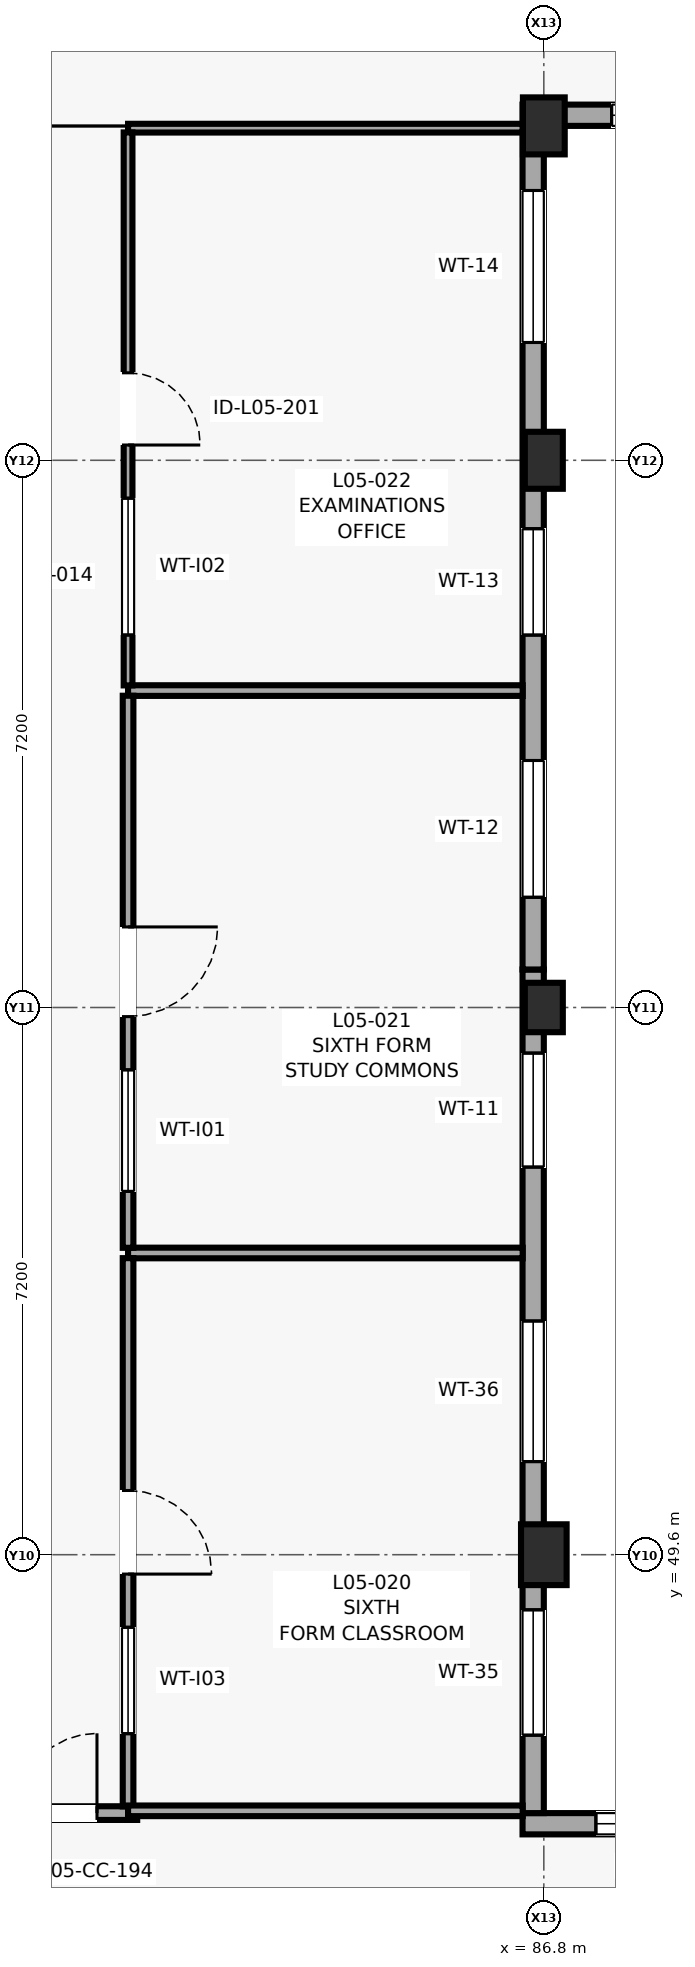
"""IFC4 building model, lengths in metres.
Left out: names, types, materials, properties, quantities, classifications, styles, units other than length and angle.
Written with IfcOpenShell. Run it as: python <this file> out.ifc"""

import sys

from ifc_helpers import new_model, si_unit, direction, frame, frame_2d, origin, origin_2d, place, context, subcontext, project, spatial, polyline, rectangle, outline, extrude, element, fill, save


model = new_model("IFC4")
c1 = context("Model", 3, precision=1e-05, world=origin(), true_north=direction((0.0, 1.0)))
c2 = subcontext(c1, "Body", "Model", "MODEL_VIEW")
j1 = project(units=[si_unit("LENGTHUNIT", "METRE"), si_unit("PLANEANGLEUNIT", "RADIAN")], contexts=[c1])
p1 = place(None, origin())
s1 = spatial("IfcSite", under=j1, at=p1, CompositionType="ELEMENT")
p2 = place(p1, origin())
s2 = spatial("IfcBuilding", under=s1, at=p2, CompositionType="ELEMENT")
p3 = place(p2, frame((0.0, 0.0, 20.2)))
s3 = spatial("IfcBuildingStorey", under=s2, at=p3, CompositionType="ELEMENT", Elevation=20.2)
p4 = place(p3, frame((86.8, 49.6, 0.0), z_axis=(0.0, 0.0, 1.0), x_axis=(1.0, 0.0, 0.0)))
e1 = element("IfcColumn", 1, at=p4, inside=s3, PredefinedType="COLUMN", context=c2, shape_type="SweptSolid", body=[
    extrude(rectangle(XDim=0.6, YDim=0.8, at=origin_2d()), origin(), (0.0, 0.0, 1.0), 4.0),
])
p5 = place(p3, frame((86.8, 56.8, 0.0), z_axis=(0.0, 0.0, 1.0), x_axis=(1.0, 0.0, 0.0)))
e2 = element("IfcColumn", 2, at=p5, inside=s3, PredefinedType="COLUMN", context=c2, shape_type="SweptSolid", body=[
    extrude(rectangle(XDim=0.5, YDim=0.65, at=origin_2d()), origin(), (0.0, 0.0, 1.0), 4.0),
])
p6 = place(p3, frame((86.8, 64.0, 0.0), z_axis=(0.0, 0.0, 1.0), x_axis=(1.0, 0.0, 0.0)))
e3 = element("IfcColumn", 3, at=p6, inside=s3, PredefinedType="COLUMN", context=c2, shape_type="SweptSolid", body=[
    extrude(rectangle(XDim=0.5, YDim=0.75, at=origin_2d()), origin(), (0.0, 0.0, 1.0), 4.0),
])
p7 = place(p3, frame((86.8, 68.4, 0.0), z_axis=(0.0, 0.0, 1.0), x_axis=(1.0, 0.0, 0.0)))
e4 = element("IfcColumn", 4, at=p7, inside=s3, PredefinedType="COLUMN", context=c2, shape_type="SweptSolid", body=[
    extrude(rectangle(XDim=0.55, YDim=0.75, at=origin_2d()), origin(), (0.0, 0.0, 1.0), 4.0),
])
p8 = place(p3, frame((89.8, 46.06, 0.0), z_axis=(0.0, 0.0, 1.0), x_axis=(-1.0, 0.0, 0.0)))
e5 = element("IfcWall", 5, at=p8, inside=s3, PredefinedType="SOLIDWALL", context=c2, shape_type="SweptSolid", body=[
    extrude(rectangle(XDim=3.28, YDim=0.28, at=frame_2d((1.64, 0.0))), origin(), (0.0, 0.0, 1.0), 3.78),
])
p9 = place(p8, frame((0.965, 0.0, 1.05)))
e6 = element("IfcOpeningElement", 6, at=p9, cuts=e5, PredefinedType="OPENING", context=c2, shape_type="SweptSolid", body=[
    extrude(rectangle(XDim=1.35, YDim=1.2, at=frame_2d((0.675, 0.6))), frame((0.0, 0.15, 0.0), z_axis=(0.0, -1.0, 0.0), x_axis=(1.0, 0.0, 0.0)), (0.0, 0.0, 1.0), 0.3),
])
p10 = place(p3, frame((86.66, 46.2, 0.0), z_axis=(0.0, 0.0, 1.0), x_axis=(0.0, 1.0, 0.0)))
e7 = element("IfcWall", 7, at=p10, inside=s3, PredefinedType="SOLIDWALL", context=c2, shape_type="SweptSolid", body=[
    extrude(rectangle(XDim=11.1, YDim=0.28, at=frame_2d((5.55, 0.0))), origin(), (0.0, 0.0, 1.0), 3.205),
])
p11 = place(p10, frame((1.025, 0.0, 1.05)))
e8 = element("IfcOpeningElement", 8, at=p11, cuts=e7, PredefinedType="OPENING", context=c2, shape_type="SweptSolid", body=[
    extrude(rectangle(XDim=1.65, YDim=1.25, at=frame_2d((0.825, 0.625))), frame((0.0, 0.15, 0.0), z_axis=(0.0, -1.0, 0.0), x_axis=(1.0, 0.0, 0.0)), (0.0, 0.0, 1.0), 0.3),
])
p12 = place(p10, frame((4.625, 0.0, 1.05)))
e9 = element("IfcOpeningElement", 9, at=p12, cuts=e7, PredefinedType="OPENING", context=c2, shape_type="SweptSolid", body=[
    extrude(rectangle(XDim=1.85, YDim=1.4, at=frame_2d((0.925, 0.7))), frame((0.0, 0.15, 0.0), z_axis=(0.0, -1.0, 0.0), x_axis=(1.0, 0.0, 0.0)), (0.0, 0.0, 1.0), 0.3),
])
p13 = place(p10, frame((8.5, 0.0, 0.75)))
e10 = element("IfcOpeningElement", 10, at=p13, cuts=e7, PredefinedType="OPENING", context=c2, shape_type="SweptSolid", body=[
    extrude(rectangle(XDim=1.5, YDim=2.2, at=frame_2d((0.75, 1.1))), frame((0.0, 0.15, 0.0), z_axis=(0.0, -1.0, 0.0), x_axis=(1.0, 0.0, 0.0)), (0.0, 0.0, 1.0), 0.3),
])
p14 = place(p3, frame((86.66, 57.3, 0.0), z_axis=(0.0, 0.0, 1.0), x_axis=(0.0, 1.0, 0.0)))
e11 = element("IfcWall", 11, at=p14, inside=s3, PredefinedType="SOLIDWALL", context=c2, shape_type="SweptSolid", body=[
    extrude(rectangle(XDim=11.1, YDim=0.28, at=frame_2d((5.55, 0.0))), origin(), (0.0, 0.0, 1.0), 3.155),
])
p15 = place(p14, frame((0.95, 0.0, 0.75)))
e12 = element("IfcOpeningElement", 12, at=p15, cuts=e11, PredefinedType="OPENING", context=c2, shape_type="SweptSolid", body=[
    extrude(rectangle(XDim=1.8, YDim=2.25, at=frame_2d((0.9, 1.125))), frame((0.0, 0.15, 0.0), z_axis=(0.0, -1.0, 0.0), x_axis=(1.0, 0.0, 0.0)), (0.0, 0.0, 1.0), 0.3),
])
p16 = place(p14, frame((4.4, 0.0, 0.65)))
e13 = element("IfcOpeningElement", 13, at=p16, cuts=e11, PredefinedType="OPENING", context=c2, shape_type="SweptSolid", body=[
    extrude(rectangle(XDim=1.4, YDim=2.4, at=frame_2d((0.7, 1.2))), frame((0.0, 0.15, 0.0), z_axis=(0.0, -1.0, 0.0), x_axis=(1.0, 0.0, 0.0)), (0.0, 0.0, 1.0), 0.3),
])
p17 = place(p14, frame((8.25, 0.0, 0.75)))
e14 = element("IfcOpeningElement", 14, at=p17, cuts=e11, PredefinedType="OPENING", context=c2, shape_type="SweptSolid", body=[
    extrude(rectangle(XDim=2.0, YDim=2.1, at=frame_2d((1.0, 1.05))), frame((0.0, 0.15, 0.0), z_axis=(0.0, -1.0, 0.0), x_axis=(1.0, 0.0, 0.0)), (0.0, 0.0, 1.0), 0.3),
])
p18 = place(p3, frame((86.52, 68.54, 0.0), z_axis=(0.0, 0.0, 1.0), x_axis=(1.0, 0.0, 0.0)))
e15 = element("IfcWall", 15, at=p18, inside=s3, PredefinedType="SOLIDWALL", context=c2, shape_type="SweptSolid", body=[
    extrude(rectangle(XDim=11.98, YDim=0.28, at=frame_2d((5.99, 0.0))), origin(), (0.0, 0.0, 1.0), 3.78),
])
p19 = place(p18, frame((1.172, 0.0, 0.85)))
e16 = element("IfcOpeningElement", 16, at=p19, cuts=e15, PredefinedType="OPENING", context=c2, shape_type="SweptSolid", body=[
    extrude(rectangle(XDim=1.65, YDim=1.95, at=frame_2d((0.825, 0.975))), frame((0.0, 0.15, 0.0), z_axis=(0.0, -1.0, 0.0), x_axis=(1.0, 0.0, 0.0)), (0.0, 0.0, 1.0), 0.3),
])
p20 = place(p18, frame((5.44, 0.0, 0.75)))
e17 = element("IfcOpeningElement", 17, at=p20, cuts=e15, PredefinedType="OPENING", context=c2, shape_type="SweptSolid", body=[
    extrude(rectangle(XDim=1.1, YDim=2.1, at=frame_2d((0.55, 1.05))), frame((0.0, 0.15, 0.0), z_axis=(0.0, -1.0, 0.0), x_axis=(1.0, 0.0, 0.0)), (0.0, 0.0, 1.0), 0.3),
])
p21 = place(p18, frame((9.208, 0.0, 0.85)))
e18 = element("IfcOpeningElement", 18, at=p21, cuts=e15, PredefinedType="OPENING", context=c2, shape_type="SweptSolid", body=[
    extrude(rectangle(XDim=1.55, YDim=1.85, at=frame_2d((0.775, 0.925))), frame((0.0, 0.15, 0.0), z_axis=(0.0, -1.0, 0.0), x_axis=(1.0, 0.0, 0.0)), (0.0, 0.0, 1.0), 0.3),
])
p22 = place(p3, frame((89.799, 46.102, 4.0), z_axis=(0.0, 0.0, 1.0), x_axis=(-1.0, 0.0, 0.0)))
e19 = element("IfcWall", 19, at=p22, inside=s3, PredefinedType="PARAPET", context=c2, shape_type="SweptSolid", body=[
    extrude(rectangle(XDim=3.194, YDim=0.165, at=frame_2d((1.597, 0.0))), origin(), (0.0, 0.0, 1.0), 1.12),
])
p23 = place(p3, frame((86.702, 46.199, 4.0), z_axis=(0.0, 0.0, 1.0), x_axis=(0.0, 1.0, 0.0)))
e20 = element("IfcWall", 20, at=p23, inside=s3, PredefinedType="PARAPET", context=c2, shape_type="SweptSolid", body=[
    extrude(outline(polyline([(0.0, 0.0), (22.006, 0.0), (22.006, 1.12), (14.964, 1.12), (14.914, 1.46), (7.092, 1.46), (7.042, 1.12), (0.0, 1.12), (0.0, 0.0)])), frame((0.0, 0.098, 0.0), z_axis=(0.0, -1.0, 0.0), x_axis=(1.0, 0.0, 0.0)), (0.0, 0.0, 1.0), 0.195),
])
p24 = place(p3, frame((86.799, 68.302, 4.0), z_axis=(0.0, 0.0, 1.0), x_axis=(-1.0, 0.0, 0.0)))
e21 = element("IfcWall", 21, at=p24, inside=s3, PredefinedType="PARAPET", context=c2, shape_type="SweptSolid", body=[
    extrude(rectangle(XDim=7.598, YDim=0.195, at=frame_2d((3.799, 0.0))), origin(), (0.0, 0.0, 1.0), 1.12),
])
p25 = place(p3, frame((75.6, 68.498, 4.0), z_axis=(0.0, 0.0, 1.0), x_axis=(1.0, 0.0, 0.0)))
e22 = element("IfcWall", 22, at=p25, inside=s3, PredefinedType="PARAPET", context=c2, shape_type="SweptSolid", body=[
    extrude(outline(polyline([(0.0, 0.0), (39.999, 0.0), (39.999, 1.12), (27.199, 1.12), (27.149, 1.46), (12.85, 1.46), (12.8, 1.12), (0.0, 1.12), (0.0, 0.0)])), frame((0.0, 0.098, 0.0), z_axis=(0.0, -1.0, 0.0), x_axis=(1.0, 0.0, 0.0)), (0.0, 0.0, 1.0), 0.195),
])
p26 = place(p3, frame((79.341, 46.2, 0.0), z_axis=(0.0, 0.0, 1.0), x_axis=(1.0, 0.0, 0.0)))
e23 = element("IfcWall", 23, at=p26, inside=s3, PredefinedType="PARTITIONING", context=c2, shape_type="SweptSolid", body=[
    extrude(rectangle(XDim=2.109, YDim=0.18, at=frame_2d((1.054, 0.0))), origin(), (0.0, 0.0, 1.0), 3.78),
])
p27 = place(p26, frame((0.53, 0.0, 0.0)))
e24 = element("IfcOpeningElement", 24, at=p27, cuts=e23, PredefinedType="OPENING", context=c2, shape_type="SweptSolid", body=[
    extrude(rectangle(XDim=1.05, YDim=2.15, at=frame_2d((0.525, 1.075))), frame((0.0, 0.1, 0.0), z_axis=(0.0, -1.0, 0.0), x_axis=(1.0, 0.0, 0.0)), (0.0, 0.0, 1.0), 0.2),
])
p28 = place(p3, frame((86.522, 53.57, 0.0), z_axis=(0.0, 0.0, 1.0), x_axis=(-1.0, 0.0, 0.0)))
e25 = element("IfcWall", 25, at=p28, inside=s3, PredefinedType="PARTITIONING", context=c2, shape_type="SweptSolid", body=[
    extrude(rectangle(XDim=5.192, YDim=0.14, at=frame_2d((2.596, 0.0))), origin(), (0.0, 0.0, 1.0), 3.755),
])
p29 = place(p3, frame((81.33, 53.502, 0.0), z_axis=(0.0, 0.0, 1.0), x_axis=(0.0, -1.0, 0.0)))
e26 = element("IfcWall", 26, at=p29, inside=s3, PredefinedType="PARTITIONING", context=c2, shape_type="SweptSolid", body=[
    extrude(rectangle(XDim=7.214, YDim=0.14, at=frame_2d((3.607, 0.0))), origin(), (0.0, 0.0, 1.0), 3.755),
])
p30 = place(p29, frame((3.057, 0.0, 0.0)))
e27 = element("IfcOpeningElement", 27, at=p30, cuts=e26, PredefinedType="OPENING", context=c2, shape_type="SweptSolid", body=[
    extrude(rectangle(XDim=1.1, YDim=2.1, at=frame_2d((0.55, 1.05))), frame((0.0, 0.08, 0.0), z_axis=(0.0, -1.0, 0.0), x_axis=(1.0, 0.0, 0.0)), (0.0, 0.0, 1.0), 0.16),
])
p31 = place(p29, frame((4.857, 0.0, 1.05)))
e28 = element("IfcOpeningElement", 28, at=p31, cuts=e26, PredefinedType="OPENING", context=c2, shape_type="SweptSolid", body=[
    extrude(rectangle(XDim=1.4, YDim=1.05, at=frame_2d((0.7, 0.525))), frame((0.0, 0.08, 0.0), z_axis=(0.0, -1.0, 0.0), x_axis=(1.0, 0.0, 0.0)), (0.0, 0.0, 1.0), 0.16),
])
for number, where, z_axis, x_axis in (
    (29, (81.33, 46.23, 0.0), (0.0, 0.0, 1.0), (1.0, 0.0, 0.0)),
    (30, (86.522, 60.97, 0.0), (0.0, 0.0, 1.0), (-1.0, 0.0, 0.0)),
):
    element("IfcWall", number, at=place(p3, frame(where, z_axis=z_axis, x_axis=x_axis)), inside=s3, PredefinedType="PARTITIONING", context=c2, shape_type="SweptSolid", body=[
        extrude(rectangle(XDim=5.192, YDim=0.14, at=frame_2d((2.596, 0.0))), origin(), (0.0, 0.0, 1.0), 3.755),
    ])
p32 = place(p3, frame((81.33, 60.902, 0.0), z_axis=(0.0, 0.0, 1.0), x_axis=(0.0, -1.0, 0.0)))
e31 = element("IfcWall", 31, at=p32, inside=s3, PredefinedType="PARTITIONING", context=c2, shape_type="SweptSolid", body=[
    extrude(rectangle(XDim=7.264, YDim=0.14, at=frame_2d((3.632, 0.0))), origin(), (0.0, 0.0, 1.0), 3.755),
])
p33 = place(p32, frame((3.042, 0.0, 0.0)))
e32 = element("IfcOpeningElement", 32, at=p33, cuts=e31, PredefinedType="OPENING", context=c2, shape_type="SweptSolid", body=[
    extrude(rectangle(XDim=1.18, YDim=2.2, at=frame_2d((0.59, 1.1))), frame((0.0, 0.08, 0.0), z_axis=(0.0, -1.0, 0.0), x_axis=(1.0, 0.0, 0.0)), (0.0, 0.0, 1.0), 0.16),
])
p34 = place(p32, frame((4.922, 0.0, 1.05)))
e33 = element("IfcOpeningElement", 33, at=p34, cuts=e31, PredefinedType="OPENING", context=c2, shape_type="SweptSolid", body=[
    extrude(rectangle(XDim=1.6, YDim=1.1, at=frame_2d((0.8, 0.55))), frame((0.0, 0.08, 0.0), z_axis=(0.0, -1.0, 0.0), x_axis=(1.0, 0.0, 0.0)), (0.0, 0.0, 1.0), 0.16),
])
p35 = place(p3, frame((86.522, 68.37, 0.0), z_axis=(0.0, 0.0, 1.0), x_axis=(-1.0, 0.0, 0.0)))
e34 = element("IfcWall", 34, at=p35, inside=s3, PredefinedType="PARTITIONING", context=c2, shape_type="SweptSolid", body=[
    extrude(rectangle(XDim=5.192, YDim=0.115, at=frame_2d((2.596, 0.0))), origin(), (0.0, 0.0, 1.0), 3.055),
])
p36 = place(p3, frame((81.33, 68.314, 0.0), z_axis=(0.0, 0.0, 1.0), x_axis=(0.0, -1.0, 0.0)))
e35 = element("IfcWall", 35, at=p36, inside=s3, PredefinedType="PARTITIONING", context=c2, shape_type="SweptSolid", body=[
    extrude(rectangle(XDim=7.276, YDim=0.115, at=frame_2d((3.638, 0.0))), origin(), (0.0, 0.0, 1.0), 3.755),
])
p37 = place(p36, frame((3.163, 0.0, 0.0)))
e36 = element("IfcOpeningElement", 36, at=p37, cuts=e35, PredefinedType="OPENING", context=c2, shape_type="SweptSolid", body=[
    extrude(rectangle(XDim=0.95, YDim=2.05, at=frame_2d((0.475, 1.025))), frame((0.0, 0.067, 0.0), z_axis=(0.0, -1.0, 0.0), x_axis=(1.0, 0.0, 0.0)), (0.0, 0.0, 1.0), 0.135),
])
p38 = place(p36, frame((4.813, 0.0, 1.05)))
e37 = element("IfcOpeningElement", 37, at=p38, cuts=e35, PredefinedType="OPENING", context=c2, shape_type="SweptSolid", body=[
    extrude(rectangle(XDim=1.8, YDim=1.2, at=frame_2d((0.9, 0.6))), frame((0.0, 0.067, 0.0), z_axis=(0.0, -1.0, 0.0), x_axis=(1.0, 0.0, 0.0)), (0.0, 0.0, 1.0), 0.135),
])
p39 = place(p9, origin())
e38 = element("IfcWindow", 38, at=p39, inside=s3, PartitioningType="SINGLE_PANEL", PredefinedType="WINDOW", context=c2, shape_type="SweptSolid", body=[
    extrude(rectangle(XDim=1.35, YDim=1.2, at=frame_2d((0.675, 0.6))), frame((0.0, 0.03, 0.0), z_axis=(0.0, -1.0, 0.0), x_axis=(1.0, 0.0, 0.0)), (0.0, 0.0, 1.0), 0.06),
])
fill(e6, e38)
p40 = place(p11, origin())
e39 = element("IfcWindow", 39, at=p40, inside=s3, PartitioningType="SINGLE_PANEL", PredefinedType="WINDOW", context=c2, shape_type="SweptSolid", body=[
    extrude(rectangle(XDim=1.65, YDim=1.25, at=frame_2d((0.825, 0.625))), frame((0.0, 0.03, 0.0), z_axis=(0.0, -1.0, 0.0), x_axis=(1.0, 0.0, 0.0)), (0.0, 0.0, 1.0), 0.06),
])
fill(e8, e39)
p41 = place(p12, origin())
e40 = element("IfcWindow", 40, at=p41, inside=s3, PartitioningType="SINGLE_PANEL", PredefinedType="WINDOW", context=c2, shape_type="SweptSolid", body=[
    extrude(rectangle(XDim=1.85, YDim=1.4, at=frame_2d((0.925, 0.7))), frame((0.0, 0.03, 0.0), z_axis=(0.0, -1.0, 0.0), x_axis=(1.0, 0.0, 0.0)), (0.0, 0.0, 1.0), 0.06),
])
fill(e9, e40)
p42 = place(p13, origin())
e41 = element("IfcWindow", 41, at=p42, inside=s3, PartitioningType="SINGLE_PANEL", PredefinedType="WINDOW", context=c2, shape_type="SweptSolid", body=[
    extrude(rectangle(XDim=1.5, YDim=2.2, at=frame_2d((0.75, 1.1))), frame((0.0, 0.03, 0.0), z_axis=(0.0, -1.0, 0.0), x_axis=(1.0, 0.0, 0.0)), (0.0, 0.0, 1.0), 0.06),
])
fill(e10, e41)
p43 = place(p15, origin())
e42 = element("IfcWindow", 42, at=p43, inside=s3, PartitioningType="SINGLE_PANEL", PredefinedType="WINDOW", context=c2, shape_type="SweptSolid", body=[
    extrude(rectangle(XDim=1.8, YDim=2.25, at=frame_2d((0.9, 1.125))), frame((0.0, 0.03, 0.0), z_axis=(0.0, -1.0, 0.0), x_axis=(1.0, 0.0, 0.0)), (0.0, 0.0, 1.0), 0.06),
])
fill(e12, e42)
p44 = place(p16, origin())
e43 = element("IfcWindow", 43, at=p44, inside=s3, PartitioningType="SINGLE_PANEL", PredefinedType="WINDOW", context=c2, shape_type="SweptSolid", body=[
    extrude(rectangle(XDim=1.4, YDim=2.4, at=frame_2d((0.7, 1.2))), frame((0.0, 0.03, 0.0), z_axis=(0.0, -1.0, 0.0), x_axis=(1.0, 0.0, 0.0)), (0.0, 0.0, 1.0), 0.06),
])
fill(e13, e43)
p45 = place(p17, origin())
e44 = element("IfcWindow", 44, at=p45, inside=s3, PartitioningType="SINGLE_PANEL", PredefinedType="WINDOW", context=c2, shape_type="SweptSolid", body=[
    extrude(rectangle(XDim=2.0, YDim=2.1, at=frame_2d((1.0, 1.05))), frame((0.0, 0.03, 0.0), z_axis=(0.0, -1.0, 0.0), x_axis=(1.0, 0.0, 0.0)), (0.0, 0.0, 1.0), 0.06),
])
fill(e14, e44)
p46 = place(p19, origin())
e45 = element("IfcWindow", 45, at=p46, inside=s3, PartitioningType="SINGLE_PANEL", PredefinedType="WINDOW", context=c2, shape_type="SweptSolid", body=[
    extrude(rectangle(XDim=1.65, YDim=1.95, at=frame_2d((0.825, 0.975))), frame((0.0, 0.03, 0.0), z_axis=(0.0, -1.0, 0.0), x_axis=(1.0, 0.0, 0.0)), (0.0, 0.0, 1.0), 0.06),
])
fill(e16, e45)
p47 = place(p27, origin())
e46 = element("IfcDoor", 46, at=p47, inside=s3, OperationType="SINGLE_SWING_RIGHT", PredefinedType="DOOR", context=c2, shape_type="SweptSolid", body=[
    extrude(rectangle(XDim=1.05, YDim=2.15, at=frame_2d((0.525, 1.075))), frame((0.0, 0.025, 0.0), z_axis=(0.0, -1.0, 0.0), x_axis=(1.0, 0.0, 0.0)), (0.0, 0.0, 1.0), 0.05),
])
fill(e24, e46)
p48 = place(p30, origin())
e47 = element("IfcDoor", 47, at=p48, inside=s3, OperationType="SINGLE_SWING_RIGHT", PredefinedType="DOOR", context=c2, shape_type="SweptSolid", body=[
    extrude(rectangle(XDim=1.1, YDim=2.1, at=frame_2d((0.55, 1.05))), frame((0.0, 0.025, 0.0), z_axis=(0.0, -1.0, 0.0), x_axis=(1.0, 0.0, 0.0)), (0.0, 0.0, 1.0), 0.05),
])
fill(e27, e47)
p49 = place(p31, origin())
e48 = element("IfcWindow", 48, at=p49, inside=s3, PartitioningType="SINGLE_PANEL", PredefinedType="WINDOW", context=c2, shape_type="SweptSolid", body=[
    extrude(rectangle(XDim=1.4, YDim=1.05, at=frame_2d((0.7, 0.525))), frame((0.0, 0.03, 0.0), z_axis=(0.0, -1.0, 0.0), x_axis=(1.0, 0.0, 0.0)), (0.0, 0.0, 1.0), 0.06),
])
fill(e28, e48)
p50 = place(p33, origin())
e49 = element("IfcDoor", 49, at=p50, inside=s3, OperationType="SINGLE_SWING_LEFT", PredefinedType="DOOR", context=c2, shape_type="SweptSolid", body=[
    extrude(rectangle(XDim=1.18, YDim=2.2, at=frame_2d((0.59, 1.1))), frame((0.0, 0.025, 0.0), z_axis=(0.0, -1.0, 0.0), x_axis=(1.0, 0.0, 0.0)), (0.0, 0.0, 1.0), 0.05),
])
fill(e32, e49)
p51 = place(p34, origin())
e50 = element("IfcWindow", 50, at=p51, inside=s3, PartitioningType="SINGLE_PANEL", PredefinedType="WINDOW", context=c2, shape_type="SweptSolid", body=[
    extrude(rectangle(XDim=1.6, YDim=1.1, at=frame_2d((0.8, 0.55))), frame((0.0, 0.03, 0.0), z_axis=(0.0, -1.0, 0.0), x_axis=(1.0, 0.0, 0.0)), (0.0, 0.0, 1.0), 0.06),
])
fill(e33, e50)
p52 = place(p37, origin())
e51 = element("IfcDoor", 51, at=p52, inside=s3, OperationType="SINGLE_SWING_RIGHT", PredefinedType="DOOR", context=c2, shape_type="SweptSolid", body=[
    extrude(rectangle(XDim=0.95, YDim=2.05, at=frame_2d((0.475, 1.025))), frame((0.0, 0.025, 0.0), z_axis=(0.0, -1.0, 0.0), x_axis=(1.0, 0.0, 0.0)), (0.0, 0.0, 1.0), 0.05),
])
fill(e36, e51)
p53 = place(p38, origin())
e52 = element("IfcWindow", 52, at=p53, inside=s3, PartitioningType="SINGLE_PANEL", PredefinedType="WINDOW", context=c2, shape_type="SweptSolid", body=[
    extrude(rectangle(XDim=1.8, YDim=1.2, at=frame_2d((0.9, 0.6))), frame((0.0, 0.03, 0.0), z_axis=(0.0, -1.0, 0.0), x_axis=(1.0, 0.0, 0.0)), (0.0, 0.0, 1.0), 0.06),
])
fill(e37, e52)
save(model, sys.argv[1])
